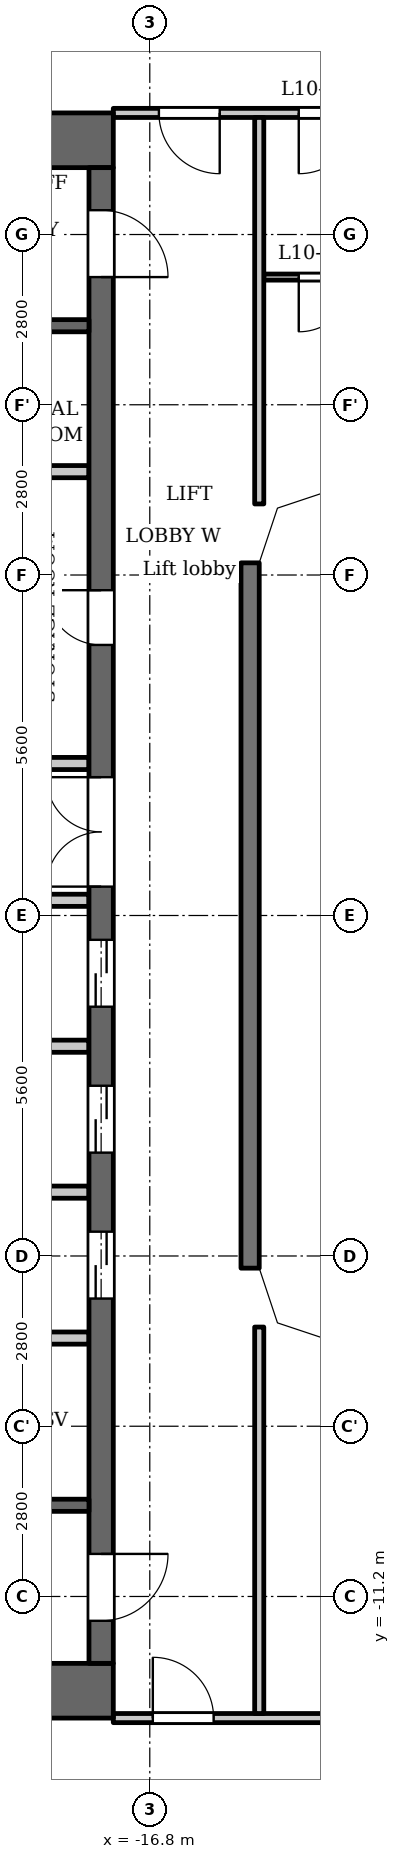
"""IFC4 building model, lengths in metres.
Left out: names, types, materials, properties, quantities, classifications, styles, units other than length and angle.
Written with IfcOpenShell. Run it as: python <this file> out.ifc"""

import sys

from ifc_helpers import new_model, si_unit, direction, frame, frame_2d, origin, place, context, subcontext, project, spatial, polyline, rectangle, outline, extrude, element, fill, save


model = new_model("IFC4")
c1 = context("Model", 3, precision=1e-05, world=origin(), true_north=direction((0.0, 1.0)))
c2 = subcontext(c1, "Body", "Model", "MODEL_VIEW")
j1 = project(units=[si_unit("LENGTHUNIT", "METRE"), si_unit("PLANEANGLEUNIT", "RADIAN")], contexts=[c1])
p1 = place(None, origin())
s1 = spatial("IfcSite", under=j1, at=p1, CompositionType="ELEMENT")
p2 = place(p1, origin())
s2 = spatial("IfcBuilding", under=s1, at=p2, CompositionType="ELEMENT")
p3 = place(p2, frame((0.0, 0.0, 44.5)))
s3 = spatial("IfcBuildingStorey", under=s2, at=p3, CompositionType="ELEMENT", Elevation=44.5)
p4 = place(p3, frame((-15.15, -5.8, 0.0), z_axis=(0.0, 0.0, 1.0), x_axis=(0.0, 1.0, 0.0)))
e1 = element("IfcWall", 1, at=p4, inside=s3, PredefinedType="SOLIDWALL", context=c2, shape_type="SweptSolid", body=[
    extrude(rectangle(XDim=11.6, YDim=0.3, at=frame_2d((5.8, 0.0))), origin(), (0.0, 0.0, 1.0), 3.2),
])
for number, where, z_axis, x_axis in (
    (2, (-17.4, 12.75, 0.0), (0.0, 0.0, 1.0), (-1.0, 0.0, 0.0)),
    (3, (-17.4, -12.75, 0.0), (0.0, 0.0, 1.0), (-1.0, 0.0, 0.0)),
):
    element("IfcWall", number, at=place(p3, frame(where, z_axis=z_axis, x_axis=x_axis)), inside=s3, PredefinedType="SHEAR", context=c2, shape_type="SweptSolid", body=[
        extrude(rectangle(XDim=10.4, YDim=0.9, at=frame_2d((5.2, 0.0))), origin(), (0.0, 0.0, 1.0), 3.2),
    ])
p5 = place(p3, frame((-17.6, -12.3, 0.0), z_axis=(0.0, 0.0, 1.0), x_axis=(0.0, 1.0, 0.0)))
e4 = element("IfcWall", 4, at=p5, inside=s3, PredefinedType="SHEAR", context=c2, shape_type="SweptSolid", body=[
    extrude(rectangle(XDim=24.6, YDim=0.4, at=frame_2d((12.3, 0.0))), origin(), (0.0, 0.0, 1.0), 3.2),
])
p6 = place(p5, frame((6.0, 0.0, 0.0)))
e5 = element("IfcOpeningElement", 5, at=p6, cuts=e4, PredefinedType="OPENING", context=c2, shape_type="SweptSolid", body=[
    extrude(rectangle(XDim=1.1, YDim=2.1, at=frame_2d((0.55, 1.05))), frame((0.0, 0.21, 0.0), z_axis=(0.0, -1.0, 0.0), x_axis=(1.0, 0.0, 0.0)), (0.0, 0.0, 1.0), 0.42),
])
p7 = place(p5, frame((8.4, 0.0, 0.0)))
e6 = element("IfcOpeningElement", 6, at=p7, cuts=e4, PredefinedType="OPENING", context=c2, shape_type="SweptSolid", body=[
    extrude(rectangle(XDim=1.1, YDim=2.1, at=frame_2d((0.55, 1.05))), frame((0.0, 0.21, 0.0), z_axis=(0.0, -1.0, 0.0), x_axis=(1.0, 0.0, 0.0)), (0.0, 0.0, 1.0), 0.42),
])
p8 = place(p5, frame((10.8, 0.0, 0.0)))
e7 = element("IfcOpeningElement", 7, at=p8, cuts=e4, PredefinedType="OPENING", context=c2, shape_type="SweptSolid", body=[
    extrude(rectangle(XDim=1.1, YDim=2.1, at=frame_2d((0.55, 1.05))), frame((0.0, 0.21, 0.0), z_axis=(0.0, -1.0, 0.0), x_axis=(1.0, 0.0, 0.0)), (0.0, 0.0, 1.0), 0.42),
])
p9 = place(p5, frame((16.75, 0.0, 0.0)))
e8 = element("IfcOpeningElement", 8, at=p9, cuts=e4, PredefinedType="OPENING", context=c2, shape_type="SweptSolid", body=[
    extrude(rectangle(XDim=0.9, YDim=2.1, at=frame_2d((0.45, 1.05))), frame((0.0, 0.21, 0.0), z_axis=(0.0, -1.0, 0.0), x_axis=(1.0, 0.0, 0.0)), (0.0, 0.0, 1.0), 0.42),
])
p10 = place(p5, frame((22.8, 0.0, 0.0)))
e9 = element("IfcOpeningElement", 9, at=p10, cuts=e4, PredefinedType="OPENING", context=c2, shape_type="SweptSolid", body=[
    extrude(rectangle(XDim=1.1, YDim=2.1, at=frame_2d((0.55, 1.05))), frame((0.0, 0.21, 0.0), z_axis=(0.0, -1.0, 0.0), x_axis=(1.0, 0.0, 0.0)), (0.0, 0.0, 1.0), 0.42),
])
p11 = place(p5, frame((0.7, 0.0, 0.0)))
e10 = element("IfcOpeningElement", 10, at=p11, cuts=e4, PredefinedType="OPENING", context=c2, shape_type="SweptSolid", body=[
    extrude(rectangle(XDim=1.1, YDim=2.1, at=frame_2d((0.55, 1.05))), frame((0.0, 0.21, 0.0), z_axis=(0.0, -1.0, 0.0), x_axis=(1.0, 0.0, 0.0)), (0.0, 0.0, 1.0), 0.42),
])
p12 = place(p5, frame((12.775, 0.0, 0.0)))
e11 = element("IfcOpeningElement", 11, at=p12, cuts=e4, PredefinedType="OPENING", context=c2, shape_type="SweptSolid", body=[
    extrude(rectangle(XDim=1.8, YDim=2.1, at=frame_2d((0.9, 1.05))), frame((0.0, 0.21, 0.0), z_axis=(0.0, -1.0, 0.0), x_axis=(1.0, 0.0, 0.0)), (0.0, 0.0, 1.0), 0.42),
])
p13 = place(p3, frame((-17.8, -9.7, 0.0), z_axis=(0.0, 0.0, 1.0), x_axis=(-1.0, 0.0, 0.0)))
e12 = element("IfcWall", 12, at=p13, inside=s3, PredefinedType="SHEAR", context=c2, shape_type="SweptSolid", body=[
    extrude(rectangle(XDim=8.3, YDim=0.2, at=frame_2d((4.15, 0.0))), origin(), (0.0, 0.0, 1.0), 3.2),
])
p14 = place(p13, frame((0.85, 0.0, 0.0)))
e13 = element("IfcOpeningElement", 13, at=p14, cuts=e12, PredefinedType="OPENING", context=c2, shape_type="SweptSolid", body=[
    extrude(rectangle(XDim=1.1, YDim=2.1, at=frame_2d((0.55, 1.05))), frame((0.0, 0.11, 0.0), z_axis=(0.0, -1.0, 0.0), x_axis=(1.0, 0.0, 0.0)), (0.0, 0.0, 1.0), 0.22),
])
p15 = place(p13, frame((3.75, 0.0, 0.0)))
e14 = element("IfcOpeningElement", 14, at=p15, cuts=e12, PredefinedType="OPENING", context=c2, shape_type="SweptSolid", body=[
    extrude(rectangle(XDim=1.1, YDim=2.1, at=frame_2d((0.55, 1.05))), frame((0.0, 0.11, 0.0), z_axis=(0.0, -1.0, 0.0), x_axis=(1.0, 0.0, 0.0)), (0.0, 0.0, 1.0), 0.22),
])
for number, where, z_axis, x_axis in (
    (15, (-17.8, -6.95, 0.0), (0.0, 0.0, 1.0), (-1.0, 0.0, 0.0)),
    (16, (-17.8, -4.55, 0.0), (0.0, 0.0, 1.0), (-1.0, 0.0, 0.0)),
    (17, (-17.8, -2.15, 0.0), (0.0, 0.0, 1.0), (-1.0, 0.0, 0.0)),
):
    element("IfcWall", number, at=place(p3, frame(where, z_axis=z_axis, x_axis=x_axis)), inside=s3, PredefinedType="PARTITIONING", context=c2, shape_type="SweptSolid", body=[
        extrude(rectangle(XDim=2.8, YDim=0.2, at=frame_2d((1.4, 0.0))), origin(), (0.0, 0.0, 1.0), 3.2),
    ])
p16 = place(p3, frame((-17.8, 0.25, 0.0), z_axis=(0.0, 0.0, 1.0), x_axis=(-1.0, 0.0, 0.0)))
e18 = element("IfcWall", 18, at=p16, inside=s3, PredefinedType="PARTITIONING", context=c2, shape_type="SweptSolid", body=[
    extrude(rectangle(XDim=3.0, YDim=0.2, at=frame_2d((1.5, 0.0))), origin(), (0.0, 0.0, 1.0), 3.2),
])
p17 = place(p3, frame((-17.8, 2.5, 0.0), z_axis=(0.0, 0.0, 1.0), x_axis=(-1.0, 0.0, 0.0)))
e19 = element("IfcWall", 19, at=p17, inside=s3, PredefinedType="PARTITIONING", context=c2, shape_type="SweptSolid", body=[
    extrude(rectangle(XDim=3.0, YDim=0.2, at=frame_2d((1.5, 0.0))), origin(), (0.0, 0.0, 1.0), 3.2),
])
p18 = place(p17, frame((1.7, 0.0, 0.0)))
e20 = element("IfcOpeningElement", 20, at=p18, cuts=e19, PredefinedType="OPENING", context=c2, shape_type="SweptSolid", body=[
    extrude(rectangle(XDim=0.9, YDim=2.1, at=frame_2d((0.45, 1.05))), frame((0.0, 0.11, 0.0), z_axis=(0.0, -1.0, 0.0), x_axis=(1.0, 0.0, 0.0)), (0.0, 0.0, 1.0), 0.22),
])
p19 = place(p3, frame((-17.8, 7.3, 0.0), z_axis=(0.0, 0.0, 1.0), x_axis=(-1.0, 0.0, 0.0)))
e21 = element("IfcWall", 21, at=p19, inside=s3, PredefinedType="PARTITIONING", context=c2, shape_type="SweptSolid", body=[
    extrude(rectangle(XDim=2.8, YDim=0.2, at=frame_2d((1.4, 0.0))), origin(), (0.0, 0.0, 1.0), 3.2),
])
p20 = place(p3, frame((-17.8, 9.7, 0.0), z_axis=(0.0, 0.0, 1.0), x_axis=(-1.0, 0.0, 0.0)))
e22 = element("IfcWall", 22, at=p20, inside=s3, PredefinedType="SHEAR", context=c2, shape_type="SweptSolid", body=[
    extrude(rectangle(XDim=8.3, YDim=0.2, at=frame_2d((4.15, 0.0))), origin(), (0.0, 0.0, 1.0), 3.2),
])
p21 = place(p20, frame((0.85, 0.0, 0.0)))
e23 = element("IfcOpeningElement", 23, at=p21, cuts=e22, PredefinedType="OPENING", context=c2, shape_type="SweptSolid", body=[
    extrude(rectangle(XDim=1.1, YDim=2.1, at=frame_2d((0.55, 1.05))), frame((0.0, 0.11, 0.0), z_axis=(0.0, -1.0, 0.0), x_axis=(1.0, 0.0, 0.0)), (0.0, 0.0, 1.0), 0.22),
])
p22 = place(p20, frame((3.75, 0.0, 0.0)))
e24 = element("IfcOpeningElement", 24, at=p22, cuts=e22, PredefinedType="OPENING", context=c2, shape_type="SweptSolid", body=[
    extrude(rectangle(XDim=1.1, YDim=2.1, at=frame_2d((0.55, 1.05))), frame((0.0, 0.11, 0.0), z_axis=(0.0, -1.0, 0.0), x_axis=(1.0, 0.0, 0.0)), (0.0, 0.0, 1.0), 0.22),
])
p23 = place(p3, frame((-17.4, -13.2, 0.0), z_axis=(0.0, 0.0, 1.0), x_axis=(1.0, 0.0, 0.0)))
e25 = element("IfcWall", 25, at=p23, inside=s3, PredefinedType="PARTITIONING", context=c2, shape_type="SweptSolid", body=[
    extrude(rectangle(XDim=34.8, YDim=0.15, at=frame_2d((17.4, 0.0))), origin(), (0.0, 0.0, 1.0), 3.2),
])
p24 = place(p23, frame((0.65, 0.0, 0.0)))
e26 = element("IfcOpeningElement", 26, at=p24, cuts=e25, PredefinedType="OPENING", context=c2, shape_type="SweptSolid", body=[
    extrude(rectangle(XDim=1.0, YDim=2.1, at=frame_2d((0.5, 1.05))), frame((0.0, 0.085, 0.0), z_axis=(0.0, -1.0, 0.0), x_axis=(1.0, 0.0, 0.0)), (0.0, 0.0, 1.0), 0.17),
])
p25 = place(p23, frame((33.05, 0.0, 0.0)))
e27 = element("IfcOpeningElement", 27, at=p25, cuts=e25, PredefinedType="OPENING", context=c2, shape_type="SweptSolid", body=[
    extrude(rectangle(XDim=1.0, YDim=2.1, at=frame_2d((0.5, 1.05))), frame((0.0, 0.085, 0.0), z_axis=(0.0, -1.0, 0.0), x_axis=(1.0, 0.0, 0.0)), (0.0, 0.0, 1.0), 0.17),
])
p26 = place(p23, frame((4.55, 0.0, 0.0)))
e28 = element("IfcOpeningElement", 28, at=p26, cuts=e25, PredefinedType="OPENING", context=c2, shape_type="SweptSolid", body=[
    extrude(rectangle(XDim=1.0, YDim=2.1, at=frame_2d((0.5, 1.05))), frame((0.0, 0.085, 0.0), z_axis=(0.0, -1.0, 0.0), x_axis=(1.0, 0.0, 0.0)), (0.0, 0.0, 1.0), 0.17),
])
p27 = place(p23, frame((6.9, 0.0, 0.0)))
e29 = element("IfcOpeningElement", 29, at=p27, cuts=e25, PredefinedType="OPENING", context=c2, shape_type="SweptSolid", body=[
    extrude(rectangle(XDim=1.0, YDim=2.1, at=frame_2d((0.5, 1.05))), frame((0.0, 0.085, 0.0), z_axis=(0.0, -1.0, 0.0), x_axis=(1.0, 0.0, 0.0)), (0.0, 0.0, 1.0), 0.17),
])
p28 = place(p23, frame((15.75, 0.0, 0.0)))
e30 = element("IfcOpeningElement", 30, at=p28, cuts=e25, PredefinedType="OPENING", context=c2, shape_type="SweptSolid", body=[
    extrude(rectangle(XDim=1.0, YDim=2.1, at=frame_2d((0.5, 1.05))), frame((0.0, 0.085, 0.0), z_axis=(0.0, -1.0, 0.0), x_axis=(1.0, 0.0, 0.0)), (0.0, 0.0, 1.0), 0.17),
])
p29 = place(p23, frame((18.1, 0.0, 0.0)))
e31 = element("IfcOpeningElement", 31, at=p29, cuts=e25, PredefinedType="OPENING", context=c2, shape_type="SweptSolid", body=[
    extrude(rectangle(XDim=1.0, YDim=2.1, at=frame_2d((0.5, 1.05))), frame((0.0, 0.085, 0.0), z_axis=(0.0, -1.0, 0.0), x_axis=(1.0, 0.0, 0.0)), (0.0, 0.0, 1.0), 0.17),
])
p30 = place(p23, frame((26.95, 0.0, 0.0)))
e32 = element("IfcOpeningElement", 32, at=p30, cuts=e25, PredefinedType="OPENING", context=c2, shape_type="SweptSolid", body=[
    extrude(rectangle(XDim=1.0, YDim=2.1, at=frame_2d((0.5, 1.05))), frame((0.0, 0.085, 0.0), z_axis=(0.0, -1.0, 0.0), x_axis=(1.0, 0.0, 0.0)), (0.0, 0.0, 1.0), 0.17),
])
p31 = place(p23, frame((29.25, 0.0, 0.0)))
e33 = element("IfcOpeningElement", 33, at=p31, cuts=e25, PredefinedType="OPENING", context=c2, shape_type="SweptSolid", body=[
    extrude(rectangle(XDim=1.0, YDim=2.1, at=frame_2d((0.5, 1.05))), frame((0.0, 0.085, 0.0), z_axis=(0.0, -1.0, 0.0), x_axis=(1.0, 0.0, 0.0)), (0.0, 0.0, 1.0), 0.17),
])
p32 = place(p3, frame((-14.925, 10.5, 0.0), z_axis=(0.0, 0.0, 1.0), x_axis=(1.0, 0.0, 0.0)))
e34 = element("IfcWall", 34, at=p32, inside=s3, PredefinedType="PARTITIONING", context=c2, shape_type="SweptSolid", body=[
    extrude(rectangle(XDim=29.85, YDim=0.1, at=frame_2d((14.925, 0.0))), origin(), (0.0, 0.0, 1.0), 3.2),
])
p33 = place(p32, frame((4.375, 0.0, 0.0)))
e35 = element("IfcOpeningElement", 35, at=p33, cuts=e34, PredefinedType="OPENING", context=c2, shape_type="SweptSolid", body=[
    extrude(rectangle(XDim=0.8, YDim=2.1, at=frame_2d((0.4, 1.05))), frame((0.0, 0.06, 0.0), z_axis=(0.0, -1.0, 0.0), x_axis=(1.0, 0.0, 0.0)), (0.0, 0.0, 1.0), 0.12),
])
p34 = place(p32, frame((0.575, 0.0, 0.0)))
e36 = element("IfcOpeningElement", 36, at=p34, cuts=e34, PredefinedType="OPENING", context=c2, shape_type="SweptSolid", body=[
    extrude(rectangle(XDim=0.9, YDim=2.1, at=frame_2d((0.45, 1.05))), frame((0.0, 0.06, 0.0), z_axis=(0.0, -1.0, 0.0), x_axis=(1.0, 0.0, 0.0)), (0.0, 0.0, 1.0), 0.12),
])
p35 = place(p32, frame((13.475, 0.0, 0.0)))
e37 = element("IfcOpeningElement", 37, at=p35, cuts=e34, PredefinedType="OPENING", context=c2, shape_type="SweptSolid", body=[
    extrude(rectangle(XDim=0.8, YDim=2.1, at=frame_2d((0.4, 1.05))), frame((0.0, 0.06, 0.0), z_axis=(0.0, -1.0, 0.0), x_axis=(1.0, 0.0, 0.0)), (0.0, 0.0, 1.0), 0.12),
])
p36 = place(p32, frame((9.975, 0.0, 0.0)))
e38 = element("IfcOpeningElement", 38, at=p36, cuts=e34, PredefinedType="OPENING", context=c2, shape_type="SweptSolid", body=[
    extrude(rectangle(XDim=0.9, YDim=2.1, at=frame_2d((0.45, 1.05))), frame((0.0, 0.06, 0.0), z_axis=(0.0, -1.0, 0.0), x_axis=(1.0, 0.0, 0.0)), (0.0, 0.0, 1.0), 0.12),
])
p37 = place(p32, frame((19.075, 0.0, 0.0)))
e39 = element("IfcOpeningElement", 39, at=p37, cuts=e34, PredefinedType="OPENING", context=c2, shape_type="SweptSolid", body=[
    extrude(rectangle(XDim=0.8, YDim=2.1, at=frame_2d((0.4, 1.05))), frame((0.0, 0.06, 0.0), z_axis=(0.0, -1.0, 0.0), x_axis=(1.0, 0.0, 0.0)), (0.0, 0.0, 1.0), 0.12),
])
p38 = place(p32, frame((16.075, 0.0, 0.0)))
e40 = element("IfcOpeningElement", 40, at=p38, cuts=e34, PredefinedType="OPENING", context=c2, shape_type="SweptSolid", body=[
    extrude(rectangle(XDim=0.9, YDim=2.1, at=frame_2d((0.45, 1.05))), frame((0.0, 0.06, 0.0), z_axis=(0.0, -1.0, 0.0), x_axis=(1.0, 0.0, 0.0)), (0.0, 0.0, 1.0), 0.12),
])
p39 = place(p32, frame((21.175, 0.0, 0.0)))
e41 = element("IfcOpeningElement", 41, at=p39, cuts=e34, PredefinedType="OPENING", context=c2, shape_type="SweptSolid", body=[
    extrude(rectangle(XDim=0.8, YDim=2.1, at=frame_2d((0.4, 1.05))), frame((0.0, 0.06, 0.0), z_axis=(0.0, -1.0, 0.0), x_axis=(1.0, 0.0, 0.0)), (0.0, 0.0, 1.0), 0.12),
])
p40 = place(p32, frame((26.775, 0.0, 0.0)))
e42 = element("IfcOpeningElement", 42, at=p40, cuts=e34, PredefinedType="OPENING", context=c2, shape_type="SweptSolid", body=[
    extrude(rectangle(XDim=0.9, YDim=2.1, at=frame_2d((0.45, 1.05))), frame((0.0, 0.06, 0.0), z_axis=(0.0, -1.0, 0.0), x_axis=(1.0, 0.0, 0.0)), (0.0, 0.0, 1.0), 0.12),
])
p41 = place(p3, frame((-17.4, 13.2, 0.0), z_axis=(0.0, 0.0, 1.0), x_axis=(1.0, 0.0, 0.0)))
e43 = element("IfcWall", 43, at=p41, inside=s3, PredefinedType="PARTITIONING", context=c2, shape_type="SweptSolid", body=[
    extrude(rectangle(XDim=34.8, YDim=0.15, at=frame_2d((17.4, 0.0))), origin(), (0.0, 0.0, 1.0), 3.2),
])
p42 = place(p41, frame((0.75, 0.0, 0.0)))
e44 = element("IfcOpeningElement", 44, at=p42, cuts=e43, PredefinedType="OPENING", context=c2, shape_type="SweptSolid", body=[
    extrude(rectangle(XDim=1.0, YDim=2.1, at=frame_2d((0.5, 1.05))), frame((0.0, 0.085, 0.0), z_axis=(0.0, -1.0, 0.0), x_axis=(1.0, 0.0, 0.0)), (0.0, 0.0, 1.0), 0.17),
])
p43 = place(p41, frame((33.15, 0.0, 0.0)))
e45 = element("IfcOpeningElement", 45, at=p43, cuts=e43, PredefinedType="OPENING", context=c2, shape_type="SweptSolid", body=[
    extrude(rectangle(XDim=1.0, YDim=2.1, at=frame_2d((0.5, 1.05))), frame((0.0, 0.085, 0.0), z_axis=(0.0, -1.0, 0.0), x_axis=(1.0, 0.0, 0.0)), (0.0, 0.0, 1.0), 0.17),
])
p44 = place(p41, frame((3.05, 0.0, 0.0)))
e46 = element("IfcOpeningElement", 46, at=p44, cuts=e43, PredefinedType="OPENING", context=c2, shape_type="SweptSolid", body=[
    extrude(rectangle(XDim=1.0, YDim=2.1, at=frame_2d((0.5, 1.05))), frame((0.0, 0.085, 0.0), z_axis=(0.0, -1.0, 0.0), x_axis=(1.0, 0.0, 0.0)), (0.0, 0.0, 1.0), 0.17),
])
p45 = place(p41, frame((12.45, 0.0, 0.0)))
e47 = element("IfcOpeningElement", 47, at=p45, cuts=e43, PredefinedType="OPENING", context=c2, shape_type="SweptSolid", body=[
    extrude(rectangle(XDim=1.0, YDim=2.1, at=frame_2d((0.5, 1.05))), frame((0.0, 0.085, 0.0), z_axis=(0.0, -1.0, 0.0), x_axis=(1.0, 0.0, 0.0)), (0.0, 0.0, 1.0), 0.17),
])
p46 = place(p41, frame((18.3, 0.0, 0.0)))
e48 = element("IfcOpeningElement", 48, at=p46, cuts=e43, PredefinedType="OPENING", context=c2, shape_type="SweptSolid", body=[
    extrude(rectangle(XDim=1.0, YDim=2.1, at=frame_2d((0.5, 1.05))), frame((0.0, 0.085, 0.0), z_axis=(0.0, -1.0, 0.0), x_axis=(1.0, 0.0, 0.0)), (0.0, 0.0, 1.0), 0.17),
])
p47 = place(p41, frame((29.25, 0.0, 0.0)))
e49 = element("IfcOpeningElement", 49, at=p47, cuts=e43, PredefinedType="OPENING", context=c2, shape_type="SweptSolid", body=[
    extrude(rectangle(XDim=1.0, YDim=2.1, at=frame_2d((0.5, 1.05))), frame((0.0, 0.085, 0.0), z_axis=(0.0, -1.0, 0.0), x_axis=(1.0, 0.0, 0.0)), (0.0, 0.0, 1.0), 0.17),
])
for number, where, z_axis, x_axis in (
    (50, (-15.0, -13.125, 0.0), (0.0, 0.0, 1.0), (0.0, 1.0, 0.0)),
    (51, (-15.0, 6.769, 0.0), (0.0, 0.0, 1.0), (0.0, 1.0, 0.0)),
):
    element("IfcWall", number, at=place(p3, frame(where, z_axis=z_axis, x_axis=x_axis)), inside=s3, PredefinedType="PARTITIONING", context=c2, shape_type="SweptSolid", body=[
        extrude(rectangle(XDim=6.356, YDim=0.15, at=frame_2d((3.178, 0.0))), origin(), (0.0, 0.0, 1.0), 3.2),
    ])
p48 = place(p3, origin())
e52 = element("IfcWall", 52, at=p48, inside=s3, PredefinedType="SOLIDWALL", context=c2, shape_type="SweptSolid", body=[
    extrude(outline(polyline([(-13.849, 7.3), (-14.937, 6.937), (-15.3, 5.849), (-15.3, 5.8), (-15.0, 5.8), (-14.7, 6.7), (-13.8, 7.0), (-13.8, 7.3), (-13.849, 7.3)])), origin(), (0.0, 0.0, 1.0), 3.2),
])
e53 = element("IfcWall", 53, at=p48, inside=s3, PredefinedType="SOLIDWALL", context=c2, shape_type="SweptSolid", body=[
    extrude(outline(polyline([(-14.937, -6.937), (-13.849, -7.3), (-13.8, -7.3), (-13.8, -7.0), (-14.7, -6.7), (-15.0, -5.8), (-15.3, -5.8), (-15.3, -5.849), (-14.937, -6.937)])), origin(), (0.0, 0.0, 1.0), 3.2),
])
p49 = place(p6, origin())
e54 = element("IfcDoor", 54, at=p49, inside=s3, OperationType="DOUBLE_DOOR_SLIDING", PredefinedType="DOOR", context=c2, shape_type="SweptSolid", body=[
    extrude(rectangle(XDim=1.1, YDim=2.1, at=frame_2d((0.55, 1.05))), frame((0.0, 0.025, 0.0), z_axis=(0.0, -1.0, 0.0), x_axis=(1.0, 0.0, 0.0)), (0.0, 0.0, 1.0), 0.05),
])
fill(e5, e54)
p50 = place(p7, origin())
e55 = element("IfcDoor", 55, at=p50, inside=s3, OperationType="DOUBLE_DOOR_SLIDING", PredefinedType="DOOR", context=c2, shape_type="SweptSolid", body=[
    extrude(rectangle(XDim=1.1, YDim=2.1, at=frame_2d((0.55, 1.05))), frame((0.0, 0.025, 0.0), z_axis=(0.0, -1.0, 0.0), x_axis=(1.0, 0.0, 0.0)), (0.0, 0.0, 1.0), 0.05),
])
fill(e6, e55)
p51 = place(p8, origin())
e56 = element("IfcDoor", 56, at=p51, inside=s3, OperationType="DOUBLE_DOOR_SLIDING", PredefinedType="DOOR", context=c2, shape_type="SweptSolid", body=[
    extrude(rectangle(XDim=1.1, YDim=2.1, at=frame_2d((0.55, 1.05))), frame((0.0, 0.025, 0.0), z_axis=(0.0, -1.0, 0.0), x_axis=(1.0, 0.0, 0.0)), (0.0, 0.0, 1.0), 0.05),
])
fill(e7, e56)
p52 = place(p9, origin())
e57 = element("IfcDoor", 57, at=p52, inside=s3, OperationType="SINGLE_SWING_LEFT", PredefinedType="DOOR", context=c2, shape_type="SweptSolid", body=[
    extrude(rectangle(XDim=0.9, YDim=2.1, at=frame_2d((0.45, 1.05))), frame((0.0, 0.025, 0.0), z_axis=(0.0, -1.0, 0.0), x_axis=(1.0, 0.0, 0.0)), (0.0, 0.0, 1.0), 0.05),
])
fill(e8, e57)
p53 = place(p10, origin())
e58 = element("IfcDoor", 58, at=p53, inside=s3, OperationType="SINGLE_SWING_LEFT", PredefinedType="DOOR", context=c2, shape_type="SweptSolid", body=[
    extrude(rectangle(XDim=1.1, YDim=2.1, at=frame_2d((0.55, 1.05))), frame((0.0, 0.025, 0.0), z_axis=(0.0, -1.0, 0.0), x_axis=(1.0, 0.0, 0.0)), (0.0, 0.0, 1.0), 0.05),
])
fill(e9, e58)
p54 = place(p11, origin())
e59 = element("IfcDoor", 59, at=p54, inside=s3, OperationType="SINGLE_SWING_RIGHT", PredefinedType="DOOR", context=c2, shape_type="SweptSolid", body=[
    extrude(rectangle(XDim=1.1, YDim=2.1, at=frame_2d((0.55, 1.05))), frame((0.0, 0.025, 0.0), z_axis=(0.0, -1.0, 0.0), x_axis=(1.0, 0.0, 0.0)), (0.0, 0.0, 1.0), 0.05),
])
fill(e10, e59)
p55 = place(p12, origin())
e60 = element("IfcDoor", 60, at=p55, inside=s3, OperationType="DOUBLE_DOOR_SINGLE_SWING", PredefinedType="DOOR", context=c2, shape_type="SweptSolid", body=[
    extrude(rectangle(XDim=1.8, YDim=2.1, at=frame_2d((0.9, 1.05))), frame((0.0, 0.025, 0.0), z_axis=(0.0, -1.0, 0.0), x_axis=(1.0, 0.0, 0.0)), (0.0, 0.0, 1.0), 0.05),
])
fill(e11, e60)
p56 = place(p42, origin())
e61 = element("IfcDoor", 61, at=p56, inside=s3, OperationType="SINGLE_SWING_RIGHT", PredefinedType="DOOR", context=c2, shape_type="SweptSolid", body=[
    extrude(rectangle(XDim=1.0, YDim=2.1, at=frame_2d((0.5, 1.05))), frame((0.0, 0.025, 0.0), z_axis=(0.0, -1.0, 0.0), x_axis=(1.0, 0.0, 0.0)), (0.0, 0.0, 1.0), 0.05),
])
fill(e44, e61)
p57 = place(p24, origin())
e62 = element("IfcDoor", 62, at=p57, inside=s3, OperationType="SINGLE_SWING_RIGHT", PredefinedType="DOOR", context=c2, shape_type="SweptSolid", body=[
    extrude(rectangle(XDim=1.0, YDim=2.1, at=frame_2d((0.5, 1.05))), frame((0.0, 0.025, 0.0), z_axis=(0.0, -1.0, 0.0), x_axis=(1.0, 0.0, 0.0)), (0.0, 0.0, 1.0), 0.05),
])
fill(e26, e62)
p58 = place(p44, origin())
e63 = element("IfcDoor", 63, at=p58, inside=s3, OperationType="SINGLE_SWING_LEFT", PredefinedType="DOOR", context=c2, shape_type="SweptSolid", body=[
    extrude(rectangle(XDim=1.0, YDim=2.1, at=frame_2d((0.5, 1.05))), frame((0.0, 0.025, 0.0), z_axis=(0.0, -1.0, 0.0), x_axis=(1.0, 0.0, 0.0)), (0.0, 0.0, 1.0), 0.05),
])
fill(e46, e63)
p59 = place(p34, origin())
e64 = element("IfcDoor", 64, at=p59, inside=s3, OperationType="SINGLE_SWING_LEFT", PredefinedType="DOOR", context=c2, shape_type="SweptSolid", body=[
    extrude(rectangle(XDim=0.9, YDim=2.1, at=frame_2d((0.45, 1.05))), frame((0.0, 0.025, 0.0), z_axis=(0.0, -1.0, 0.0), x_axis=(1.0, 0.0, 0.0)), (0.0, 0.0, 1.0), 0.05),
])
fill(e36, e64)
save(model, sys.argv[1])
